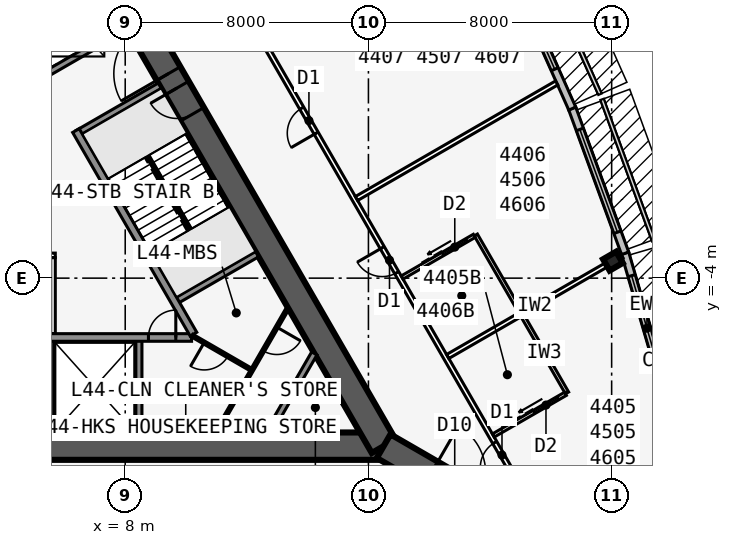
"""IFC4 building model, lengths in metres.
Left out: names, types, materials, properties, quantities, classifications, styles, units other than length and angle.
Written with IfcOpenShell. Run it as: python <this file> out.ifc"""

import sys

from ifc_helpers import new_model, si_unit, direction, frame, frame_2d, origin, origin_2d, place, context, subcontext, project, spatial, rectangle, i_section, extrude, element, fill, save


model = new_model("IFC4")
c1 = context("Model", 3, precision=1e-05, world=origin(), true_north=direction((0.0, 1.0)))
c2 = subcontext(c1, "Body", "Model", "MODEL_VIEW")
j1 = project(units=[si_unit("LENGTHUNIT", "METRE"), si_unit("PLANEANGLEUNIT", "RADIAN")], contexts=[c1])
p1 = place(None, origin())
s1 = spatial("IfcSite", under=j1, at=p1, CompositionType="ELEMENT")
p2 = place(p1, origin())
s2 = spatial("IfcBuilding", under=s1, at=p2, CompositionType="ELEMENT")
p3 = place(p2, frame((0.0, 0.0, 165.7)))
s3 = spatial("IfcBuildingStorey", under=s2, at=p3, CompositionType="ELEMENT", Elevation=165.7)
p4 = place(p3, frame((-16.5, -9.526, 0.0), z_axis=(0.0, 0.0, 1.0), x_axis=(1.0, 0.0, 0.0)))
e1 = element("IfcWall", 1, at=p4, inside=s3, PredefinedType="SHEAR", context=c2, shape_type="SweptSolid", body=[
    extrude(rectangle(XDim=33.0, YDim=0.9, at=frame_2d((16.5, 0.0))), origin(), (0.0, 0.0, 1.0), 3.4),
])
p5 = place(p4, frame((14.05, 0.0, 0.0)))
e2 = element("IfcOpeningElement", 2, at=p5, cuts=e1, PredefinedType="OPENING", context=c2, shape_type="SweptSolid", body=[
    extrude(rectangle(XDim=1.8, YDim=2.13, at=frame_2d((0.9, 1.065))), frame((0.0, 0.46, 0.0), z_axis=(0.0, -1.0, 0.0), x_axis=(1.0, 0.0, 0.0)), (0.0, 0.0, 1.0), 0.92),
])
p6 = place(p3, frame((-0.55, -5.951, 0.0), z_axis=(0.0, 0.0, 1.0), x_axis=(1.0, 0.0, 0.0)))
e3 = element("IfcWall", 3, at=p6, inside=s3, PredefinedType="SOLIDWALL", context=c2, shape_type="SweptSolid", body=[
    extrude(rectangle(XDim=10.733, YDim=0.25, at=frame_2d((5.366, 0.0))), origin(), (0.0, 0.0, 1.0), 3.235),
])
p7 = place(p6, frame((9.314, 0.0, 0.0)))
e4 = element("IfcOpeningElement", 4, at=p7, cuts=e3, PredefinedType="OPENING", context=c2, shape_type="SweptSolid", body=[
    extrude(rectangle(XDim=0.9, YDim=2.13, at=frame_2d((0.45, 1.065))), frame((0.0, 0.135, 0.0), z_axis=(0.0, -1.0, 0.0), x_axis=(1.0, 0.0, 0.0)), (0.0, 0.0, 1.0), 0.27),
])
p8 = place(p6, frame((1.05, 0.0, 0.0)))
e5 = element("IfcOpeningElement", 5, at=p8, cuts=e3, PredefinedType="OPENING", context=c2, shape_type="SweptSolid", body=[
    extrude(rectangle(XDim=1.1, YDim=2.13, at=frame_2d((0.55, 1.065))), frame((0.0, 0.135, 0.0), z_axis=(0.0, -1.0, 0.0), x_axis=(1.0, 0.0, 0.0)), (0.0, 0.0, 1.0), 0.27),
])
p9 = place(p6, frame((4.05, 0.0, 0.0)))
e6 = element("IfcOpeningElement", 6, at=p9, cuts=e3, PredefinedType="OPENING", context=c2, shape_type="SweptSolid", body=[
    extrude(rectangle(XDim=1.1, YDim=2.13, at=frame_2d((0.55, 1.065))), frame((0.0, 0.135, 0.0), z_axis=(0.0, -1.0, 0.0), x_axis=(1.0, 0.0, 0.0)), (0.0, 0.0, 1.0), 0.27),
])
for number, where, z_axis, x_axis in (
    (7, (5.55, -5.951, 0.0), (0.0, 0.0, 1.0), (0.0, -1.0, 0.0)),
    (8, (8.45, -5.951, 0.0), (0.0, 0.0, 1.0), (0.0, -1.0, 0.0)),
):
    element("IfcWall", number, at=place(p3, frame(where, z_axis=z_axis, x_axis=x_axis)), inside=s3, PredefinedType="SOLIDWALL", context=c2, shape_type="SweptSolid", body=[
        extrude(rectangle(XDim=3.125, YDim=0.2, at=frame_2d((1.562, 0.0))), origin(), (0.0, 0.0, 1.0), 3.235),
    ])
p10 = place(p3, frame((16.5, -9.526, 0.0), z_axis=(0.0, 0.0, 1.0), x_axis=(-0.499999749417, 0.866025548458, 0.0)))
e9 = element("IfcWall", 9, at=p10, inside=s3, PredefinedType="SHEAR", context=c2, shape_type="SweptSolid", body=[
    extrude(rectangle(XDim=33.0, YDim=0.9, at=frame_2d((16.5, 0.0))), origin(), (0.0, 0.0, 1.0), 3.4),
])
p11 = place(p10, frame((14.15, 0.0, 0.0)))
e10 = element("IfcOpeningElement", 10, at=p11, cuts=e9, PredefinedType="OPENING", context=c2, shape_type="SweptSolid", body=[
    extrude(rectangle(XDim=1.8, YDim=2.13, at=frame_2d((0.9, 1.065))), frame((0.0, 0.46, 0.0), z_axis=(0.0, -1.0, 0.0), x_axis=(1.0, 0.0, 0.0)), (0.0, 0.0, 1.0), 0.92),
])
p12 = place(p10, frame((12.6, 0.0, 0.0)))
e11 = element("IfcOpeningElement", 11, at=p12, cuts=e9, PredefinedType="OPENING", context=c2, shape_type="SweptSolid", body=[
    extrude(rectangle(XDim=1.0, YDim=2.13, at=frame_2d((0.5, 1.065))), frame((0.0, 0.46, 0.0), z_axis=(0.0, -1.0, 0.0), x_axis=(1.0, 0.0, 0.0)), (0.0, 0.0, 1.0), 0.92),
])
p13 = place(p3, frame((10.245, -5.843, 0.0), z_axis=(0.0, 0.0, 1.0), x_axis=(-0.499993009313, 0.866029439822, 0.0)))
e12 = element("IfcWall", 12, at=p13, inside=s3, PredefinedType="SOLIDWALL", context=c2, shape_type="SweptSolid", body=[
    extrude(rectangle(XDim=7.733, YDim=0.25, at=frame_2d((3.866, 0.0))), origin(), (0.0, 0.0, 1.0), 3.235),
])
for number, where, z_axis, x_axis in (
    (13, (9.629, -4.775, 0.0), (0.0, 0.0, 1.0), (0.866, 0.5, 0.0)),
    (14, (6.429, 0.767, 0.0), (0.0, 0.0, 1.0), (0.866, 0.5, 0.0)),
    (15, (5.329, 2.673, 0.0), (0.0, 0.0, 1.0), (0.866, 0.5, 0.0)),
):
    element("IfcWall", number, at=place(p3, frame(where, z_axis=z_axis, x_axis=x_axis)), inside=s3, PredefinedType="SOLIDWALL", context=c2, shape_type="SweptSolid", body=[
        extrude(rectangle(XDim=3.125, YDim=0.2, at=frame_2d((1.562, 0.0))), origin(), (0.0, 0.0, 1.0), 3.235),
    ])
p14 = place(p3, frame((16.5, -9.526, 0.0), z_axis=(0.0, 0.0, 1.0), x_axis=(0.866031398331, -0.499989616998, 0.0)))
e16 = element("IfcWall", 16, at=p14, inside=s3, PredefinedType="SHEAR", context=c2, shape_type="SweptSolid", body=[
    extrude(rectangle(XDim=4.746, YDim=0.9, at=frame_2d((2.373, 0.0))), origin(), (0.0, 0.0, 1.0), 3.4),
])
p15 = place(p14, frame((1.8, 0.0, 0.0)))
e17 = element("IfcOpeningElement", 17, at=p15, cuts=e16, PredefinedType="OPENING", context=c2, shape_type="SweptSolid", body=[
    extrude(rectangle(XDim=1.8, YDim=2.13, at=frame_2d((0.9, 1.065))), frame((0.0, 0.46, 0.0), z_axis=(0.0, -1.0, 0.0), x_axis=(1.0, 0.0, 0.0)), (0.0, 0.0, 1.0), 0.92),
])
p16 = place(p3, frame((24.041, -3.44, 0.0), z_axis=(0.0, 0.0, 1.0), x_axis=(-0.5, 0.866025403784, 0.0)))
e18 = element("IfcColumn", 18, at=p16, inside=s3, PredefinedType="COLUMN", context=c2, shape_type="SweptSolid", body=[
    extrude(i_section(OverallWidth=0.432, OverallDepth=0.498, WebThickness=0.056, FlangeThickness=0.089, at=origin_2d()), origin(), (0.0, 0.0, 1.0), 3.4),
])
p17 = place(p3, frame((25.88, -8.118, 0.0), z_axis=(0.0, 0.0, 1.0), x_axis=(-0.279528287117, 0.960137457191, 0.0)))
e19 = element("IfcWall", 19, at=p17, inside=s3, PredefinedType="STANDARD", context=c2, shape_type="SweptSolid", body=[
    extrude(rectangle(XDim=5.148, YDim=0.25, at=frame_2d((2.574, 0.0))), origin(), (0.0, 0.0, 1.0), 3.235),
])
p18 = place(p17, frame((0.774, 0.0, 0.45)))
e20 = element("IfcOpeningElement", 20, at=p18, cuts=e19, PredefinedType="OPENING", context=c2, shape_type="SweptSolid", body=[
    extrude(rectangle(XDim=3.6, YDim=2.4, at=frame_2d((1.8, 1.2))), frame((0.0, 0.135, 0.0), z_axis=(0.0, -1.0, 0.0), x_axis=(1.0, 0.0, 0.0)), (0.0, 0.0, 1.0), 0.27),
])
p19 = place(p3, frame((24.444, -3.183, 0.0), z_axis=(0.0, 0.0, 1.0), x_axis=(-0.343225593282, 0.939252996863, 0.0)))
e21 = element("IfcWall", 21, at=p19, inside=s3, PredefinedType="STANDARD", context=c2, shape_type="SweptSolid", body=[
    extrude(rectangle(XDim=5.076, YDim=0.25, at=frame_2d((2.538, 0.0))), origin(), (0.0, 0.0, 1.0), 3.235),
])
p20 = place(p19, frame((0.738, 0.0, 0.45)))
e22 = element("IfcOpeningElement", 22, at=p20, cuts=e21, PredefinedType="OPENING", context=c2, shape_type="SweptSolid", body=[
    extrude(rectangle(XDim=3.6, YDim=2.4, at=frame_2d((1.8, 1.2))), frame((0.0, 0.135, 0.0), z_axis=(0.0, -1.0, 0.0), x_axis=(1.0, 0.0, 0.0)), (0.0, 0.0, 1.0), 0.27),
])
p21 = place(p3, frame((22.705, 1.576, 0.0), z_axis=(0.0, 0.0, 1.0), x_axis=(-0.406832200364, 0.913502906808, 0.0)))
e23 = element("IfcWall", 23, at=p21, inside=s3, PredefinedType="STANDARD", context=c2, shape_type="SweptSolid", body=[
    extrude(rectangle(XDim=5.028, YDim=0.25, at=frame_2d((2.514, 0.0))), origin(), (0.0, 0.0, 1.0), 3.235),
])
p22 = place(p21, frame((1.418, 0.0, 0.45)))
e24 = element("IfcOpeningElement", 24, at=p22, cuts=e23, PredefinedType="OPENING", context=c2, shape_type="SweptSolid", body=[
    extrude(rectangle(XDim=3.0, YDim=2.4, at=frame_2d((1.5, 1.2))), frame((0.0, 0.135, 0.0), z_axis=(0.0, -1.0, 0.0), x_axis=(1.0, 0.0, 0.0)), (0.0, 0.0, 1.0), 0.27),
])
p23 = place(p3, frame((21.586, -11.885, 0.0), z_axis=(0.0, 0.0, 1.0), x_axis=(-0.500001915564, 0.86602429783, 0.0)))
e25 = element("IfcWall", 25, at=p23, inside=s3, PredefinedType="PARTITIONING", context=c2, shape_type="SweptSolid", body=[
    extrude(rectangle(XDim=42.172, YDim=0.15, at=frame_2d((21.086, 0.0))), origin(), (0.0, 0.0, 1.0), 3.235),
])
p24 = place(p23, frame((1.911, 0.0, 0.0)))
e26 = element("IfcOpeningElement", 26, at=p24, cuts=e25, PredefinedType="OPENING", context=c2, shape_type="SweptSolid", body=[
    extrude(rectangle(XDim=0.95, YDim=2.13, at=frame_2d((0.475, 1.065))), frame((0.0, 0.085, 0.0), z_axis=(0.0, -1.0, 0.0), x_axis=(1.0, 0.0, 0.0)), (0.0, 0.0, 1.0), 0.17),
])
p25 = place(p23, frame((9.311, 0.0, 0.0)))
e27 = element("IfcOpeningElement", 27, at=p25, cuts=e25, PredefinedType="OPENING", context=c2, shape_type="SweptSolid", body=[
    extrude(rectangle(XDim=0.95, YDim=2.13, at=frame_2d((0.475, 1.065))), frame((0.0, 0.085, 0.0), z_axis=(0.0, -1.0, 0.0), x_axis=(1.0, 0.0, 0.0)), (0.0, 0.0, 1.0), 0.17),
])
p26 = place(p23, frame((14.611, 0.0, 0.0)))
e28 = element("IfcOpeningElement", 28, at=p26, cuts=e25, PredefinedType="OPENING", context=c2, shape_type="SweptSolid", body=[
    extrude(rectangle(XDim=0.95, YDim=2.13, at=frame_2d((0.475, 1.065))), frame((0.0, 0.085, 0.0), z_axis=(0.0, -1.0, 0.0), x_axis=(1.0, 0.0, 0.0)), (0.0, 0.0, 1.0), 0.17),
])
p27 = place(p23, frame((26.711, 0.0, 0.0)))
e29 = element("IfcOpeningElement", 29, at=p27, cuts=e25, PredefinedType="OPENING", context=c2, shape_type="SweptSolid", body=[
    extrude(rectangle(XDim=0.95, YDim=2.13, at=frame_2d((0.475, 1.065))), frame((0.0, 0.085, 0.0), z_axis=(0.0, -1.0, 0.0), x_axis=(1.0, 0.0, 0.0)), (0.0, 0.0, 1.0), 0.17),
])
p28 = place(p23, frame((38.884, 0.0, 0.0)))
e30 = element("IfcOpeningElement", 30, at=p28, cuts=e25, PredefinedType="OPENING", context=c2, shape_type="SweptSolid", body=[
    extrude(rectangle(XDim=0.95, YDim=2.13, at=frame_2d((0.475, 1.065))), frame((0.0, 0.085, 0.0), z_axis=(0.0, -1.0, 0.0), x_axis=(1.0, 0.0, 0.0)), (0.0, 0.0, 1.0), 0.17),
])
p29 = place(p3, frame((18.608, -6.577, 0.0), z_axis=(0.0, 0.0, 1.0), x_axis=(0.866031967744, 0.499988630717, 0.0)))
e31 = element("IfcWall", 31, at=p29, inside=s3, PredefinedType="PARTITIONING", context=c2, shape_type="SweptSolid", body=[
    extrude(rectangle(XDim=6.616, YDim=0.15, at=frame_2d((3.308, 0.0))), origin(), (0.0, 0.0, 1.0), 2.389),
])
p30 = place(p3, frame((15.608, -1.381, 0.0), z_axis=(0.0, 0.0, 1.0), x_axis=(0.866025154315, 0.500000432093, 0.0)))
e32 = element("IfcWall", 32, at=p30, inside=s3, PredefinedType="PARTITIONING", context=c2, shape_type="SweptSolid", body=[
    extrude(rectangle(XDim=7.603, YDim=0.15, at=frame_2d((3.801, 0.0))), origin(), (0.0, 0.0, 1.0), 3.235),
])
p31 = place(p3, frame((22.533, -7.775, 0.0), z_axis=(0.0, 0.0, 1.0), x_axis=(-0.499990139034, 0.866031096941, 0.0)))
e33 = element("IfcWall", 33, at=p31, inside=s3, PredefinedType="PLUMBINGWALL", context=c2, shape_type="SweptSolid", body=[
    extrude(rectangle(XDim=3.0, YDim=0.12, at=frame_2d((1.5, 0.0))), origin(), (0.0, 0.0, 1.0), 3.235),
])
p32 = place(p3, frame((20.108, -9.175, 0.0), z_axis=(0.0, 0.0, 1.0), x_axis=(0.866035715982, 0.499982138324, 0.0)))
e34 = element("IfcWall", 34, at=p32, inside=s3, PredefinedType="PLUMBINGWALL", context=c2, shape_type="SweptSolid", body=[
    extrude(rectangle(XDim=2.74, YDim=0.12, at=frame_2d((1.37, 0.0))), origin(), (0.0, 0.0, 1.0), 3.235),
])
p33 = place(p32, frame((1.55, 0.0, 0.0)))
e35 = element("IfcOpeningElement", 35, at=p33, cuts=e34, PredefinedType="OPENING", context=c2, shape_type="SweptSolid", body=[
    extrude(rectangle(XDim=0.9, YDim=2.13, at=frame_2d((0.45, 1.065))), frame((0.0, 0.07, 0.0), z_axis=(0.0, -1.0, 0.0), x_axis=(1.0, 0.0, 0.0)), (0.0, 0.0, 1.0), 0.14),
])
p34 = place(p3, frame((21.033, -5.177, 0.0), z_axis=(0.0, 0.0, 1.0), x_axis=(-0.499990139034, 0.866031096941, 0.0)))
e36 = element("IfcWall", 36, at=p34, inside=s3, PredefinedType="PLUMBINGWALL", context=c2, shape_type="SweptSolid", body=[
    extrude(rectangle(XDim=3.0, YDim=0.12, at=frame_2d((1.5, 0.0))), origin(), (0.0, 0.0, 1.0), 3.235),
])
p35 = place(p3, frame((17.108, -3.979, 0.0), z_axis=(0.0, 0.0, 1.0), x_axis=(0.865997131366, 0.500048966069, 0.0)))
e37 = element("IfcWall", 37, at=p35, inside=s3, PredefinedType="PLUMBINGWALL", context=c2, shape_type="SweptSolid", body=[
    extrude(rectangle(XDim=2.74, YDim=0.12, at=frame_2d((1.37, 0.0))), origin(), (0.0, 0.0, 1.0), 3.235),
])
p36 = place(p35, frame((1.55, 0.0, 0.0)))
e38 = element("IfcOpeningElement", 38, at=p36, cuts=e37, PredefinedType="OPENING", context=c2, shape_type="SweptSolid", body=[
    extrude(rectangle(XDim=0.9, YDim=2.13, at=frame_2d((0.45, 1.065))), frame((0.0, 0.07, 0.0), z_axis=(0.0, -1.0, 0.0), x_axis=(1.0, 0.0, 0.0)), (0.0, 0.0, 1.0), 0.14),
])
p37 = place(p3, frame((-2.65, -3.251, 0.0), z_axis=(0.0, 0.0, 1.0), x_axis=(1.0, 0.0, 0.0)))
e39 = element("IfcWall", 39, at=p37, inside=s3, PredefinedType="PARTITIONING", context=c2, shape_type="SweptSolid", body=[
    extrude(rectangle(XDim=8.35, YDim=0.15, at=frame_2d((4.175, 0.0))), origin(), (0.0, 0.0, 1.0), 3.235),
])
p38 = place(p3, frame((5.625, -5.826, 0.0), z_axis=(0.0, 0.0, 1.0), x_axis=(0.0, 1.0, 0.0)))
e40 = element("IfcWall", 40, at=p38, inside=s3, PredefinedType="PARTITIONING", context=c2, shape_type="SweptSolid", body=[
    extrude(rectangle(XDim=2.5, YDim=0.15, at=frame_2d((1.25, 0.0))), origin(), (0.0, 0.0, 1.0), 3.235),
])
p39 = place(p3, frame((14.219, -6.476, 0.0), z_axis=(0.0, 0.0, 1.0), x_axis=(-0.499952404951, -0.866052881055, 0.0)))
e41 = element("IfcWall", 41, at=p39, inside=s3, PredefinedType="SOLIDWALL", context=c2, shape_type="SweptSolid", body=[
    extrude(rectangle(XDim=3.002, YDim=0.2, at=frame_2d((1.501, 0.0))), origin(), (0.0, 0.0, 1.0), 3.235),
])
p40 = place(p3, frame((13.354, -4.976, 0.0), z_axis=(0.0, 0.0, 1.0), x_axis=(-0.499999210213, -0.866025859768, 0.0)))
e42 = element("IfcWall", 42, at=p40, inside=s3, PredefinedType="PARTITIONING", context=c2, shape_type="SweptSolid", body=[
    extrude(rectangle(XDim=4.734, YDim=0.1, at=frame_2d((2.367, 0.0))), origin(), (0.0, 0.0, 1.0), 3.235),
])
p41 = place(p40, frame((0.734, 0.0, 0.0)))
e43 = element("IfcOpeningElement", 43, at=p41, cuts=e42, PredefinedType="OPENING", context=c2, shape_type="SweptSolid", body=[
    extrude(rectangle(XDim=0.9, YDim=2.13, at=frame_2d((0.45, 1.065))), frame((0.0, 0.06, 0.0), z_axis=(0.0, -1.0, 0.0), x_axis=(1.0, 0.0, 0.0)), (0.0, 0.0, 1.0), 0.12),
])
p42 = place(p3, frame((12.17, -7.026, 0.0), z_axis=(0.0, 0.0, 1.0), x_axis=(-0.866015833478, 0.50001657589, 0.0)))
e44 = element("IfcWall", 44, at=p42, inside=s3, PredefinedType="PARTITIONING", context=c2, shape_type="SweptSolid", body=[
    extrude(rectangle(XDim=2.275, YDim=0.1, at=frame_2d((1.138, 0.0))), origin(), (0.0, 0.0, 1.0), 3.235),
])
p43 = place(p42, frame((0.915, 0.0, 0.0)))
e45 = element("IfcOpeningElement", 45, at=p43, cuts=e44, PredefinedType="OPENING", context=c2, shape_type="SweptSolid", body=[
    extrude(rectangle(XDim=0.9, YDim=2.13, at=frame_2d((0.45, 1.065))), frame((0.0, 0.06, 0.0), z_axis=(0.0, -1.0, 0.0), x_axis=(1.0, 0.0, 0.0)), (0.0, 0.0, 1.0), 0.12),
])
p44 = place(p3, frame((10.135, -2.401, 0.0), z_axis=(0.0, 0.0, 1.0), x_axis=(-0.499992232847, 0.866029888106, 0.0)))
e46 = element("IfcWall", 46, at=p44, inside=s3, PredefinedType="SOLIDWALL", context=c2, shape_type="SweptSolid", body=[
    extrude(rectangle(XDim=2.794, YDim=0.1, at=frame_2d((1.397, 0.0))), origin(), (0.0, 0.0, 1.0), 3.4),
])
p45 = place(p18, origin())
e47 = element("IfcWindow", 47, at=p45, inside=s3, PartitioningType="SINGLE_PANEL", PredefinedType="WINDOW", context=c2, shape_type="SweptSolid", body=[
    extrude(rectangle(XDim=3.6, YDim=2.4, at=frame_2d((1.8, 1.2))), frame((0.0, 0.03, 0.0), z_axis=(0.0, -1.0, 0.0), x_axis=(1.0, 0.0, 0.0)), (0.0, 0.0, 1.0), 0.06),
])
fill(e20, e47)
p46 = place(p20, origin())
e48 = element("IfcWindow", 48, at=p46, inside=s3, PartitioningType="SINGLE_PANEL", PredefinedType="WINDOW", context=c2, shape_type="SweptSolid", body=[
    extrude(rectangle(XDim=3.6, YDim=2.4, at=frame_2d((1.8, 1.2))), frame((0.0, 0.03, 0.0), z_axis=(0.0, -1.0, 0.0), x_axis=(1.0, 0.0, 0.0)), (0.0, 0.0, 1.0), 0.06),
])
fill(e22, e48)
p47 = place(p22, origin())
e49 = element("IfcWindow", 49, at=p47, inside=s3, PartitioningType="SINGLE_PANEL", PredefinedType="WINDOW", context=c2, shape_type="SweptSolid", body=[
    extrude(rectangle(XDim=3.0, YDim=2.4, at=frame_2d((1.5, 1.2))), frame((0.0, 0.03, 0.0), z_axis=(0.0, -1.0, 0.0), x_axis=(1.0, 0.0, 0.0)), (0.0, 0.0, 1.0), 0.06),
])
fill(e24, e49)
p48 = place(p33, origin())
e50 = element("IfcDoor", 50, at=p48, inside=s3, OperationType="SLIDING_TO_LEFT", PredefinedType="DOOR", context=c2, shape_type="SweptSolid", body=[
    extrude(rectangle(XDim=0.9, YDim=2.13, at=frame_2d((0.45, 1.065))), frame((0.0, 0.025, 0.0), z_axis=(0.0, -1.0, 0.0), x_axis=(1.0, 0.0, 0.0)), (0.0, 0.0, 1.0), 0.05),
])
fill(e35, e50)
p49 = place(p24, origin())
e51 = element("IfcDoor", 51, at=p49, inside=s3, OperationType="SINGLE_SWING_LEFT", PredefinedType="DOOR", context=c2, shape_type="SweptSolid", body=[
    extrude(rectangle(XDim=0.95, YDim=2.13, at=frame_2d((0.475, 1.065))), frame((0.0, 0.025, 0.0), z_axis=(0.0, -1.0, 0.0), x_axis=(1.0, 0.0, 0.0)), (0.0, 0.0, 1.0), 0.05),
])
fill(e26, e51)
p50 = place(p36, origin())
e52 = element("IfcDoor", 52, at=p50, inside=s3, OperationType="SLIDING_TO_LEFT", PredefinedType="DOOR", context=c2, shape_type="SweptSolid", body=[
    extrude(rectangle(XDim=0.9, YDim=2.13, at=frame_2d((0.45, 1.065))), frame((0.0, 0.025, 0.0), z_axis=(0.0, -1.0, 0.0), x_axis=(1.0, 0.0, 0.0)), (0.0, 0.0, 1.0), 0.05),
])
fill(e38, e52)
p51 = place(p25, origin())
e53 = element("IfcDoor", 53, at=p51, inside=s3, OperationType="SINGLE_SWING_RIGHT", PredefinedType="DOOR", context=c2, shape_type="SweptSolid", body=[
    extrude(rectangle(XDim=0.95, YDim=2.13, at=frame_2d((0.475, 1.065))), frame((0.0, 0.025, 0.0), z_axis=(0.0, -1.0, 0.0), x_axis=(1.0, 0.0, 0.0)), (0.0, 0.0, 1.0), 0.05),
])
fill(e27, e53)
p52 = place(p26, origin())
e54 = element("IfcDoor", 54, at=p52, inside=s3, OperationType="SINGLE_SWING_LEFT", PredefinedType="DOOR", context=c2, shape_type="SweptSolid", body=[
    extrude(rectangle(XDim=0.95, YDim=2.13, at=frame_2d((0.475, 1.065))), frame((0.0, 0.025, 0.0), z_axis=(0.0, -1.0, 0.0), x_axis=(1.0, 0.0, 0.0)), (0.0, 0.0, 1.0), 0.05),
])
fill(e28, e54)
p53 = place(p11, origin())
e55 = element("IfcDoor", 55, at=p53, inside=s3, OperationType="DOUBLE_DOOR_SINGLE_SWING", PredefinedType="DOOR", context=c2, shape_type="SweptSolid", body=[
    extrude(rectangle(XDim=1.8, YDim=2.13, at=frame_2d((0.9, 1.065))), frame((0.0, 0.025, 0.0), z_axis=(0.0, -1.0, 0.0), x_axis=(1.0, 0.0, 0.0)), (0.0, 0.0, 1.0), 0.05),
])
fill(e10, e55)
p54 = place(p12, origin())
e56 = element("IfcDoor", 56, at=p54, inside=s3, OperationType="SINGLE_SWING_RIGHT", PredefinedType="DOOR", context=c2, shape_type="SweptSolid", body=[
    extrude(rectangle(XDim=1.0, YDim=2.13, at=frame_2d((0.5, 1.065))), frame((0.0, 0.025, 0.0), z_axis=(0.0, -1.0, 0.0), x_axis=(1.0, 0.0, 0.0)), (0.0, 0.0, 1.0), 0.05),
])
fill(e11, e56)
p55 = place(p41, origin())
e57 = element("IfcDoor", 57, at=p55, inside=s3, OperationType="SINGLE_SWING_LEFT", PredefinedType="DOOR", context=c2, shape_type="SweptSolid", body=[
    extrude(rectangle(XDim=0.9, YDim=2.13, at=frame_2d((0.45, 1.065))), frame((0.0, 0.025, 0.0), z_axis=(0.0, -1.0, 0.0), x_axis=(1.0, 0.0, 0.0)), (0.0, 0.0, 1.0), 0.05),
])
fill(e43, e57)
p56 = place(p7, origin())
e58 = element("IfcDoor", 58, at=p56, inside=s3, OperationType="SINGLE_SWING_RIGHT", PredefinedType="DOOR", context=c2, shape_type="SweptSolid", body=[
    extrude(rectangle(XDim=0.9, YDim=2.13, at=frame_2d((0.45, 1.065))), frame((0.0, 0.025, 0.0), z_axis=(0.0, -1.0, 0.0), x_axis=(1.0, 0.0, 0.0)), (0.0, 0.0, 1.0), 0.05),
])
fill(e4, e58)
p57 = place(p43, origin())
e59 = element("IfcDoor", 59, at=p57, inside=s3, OperationType="SINGLE_SWING_RIGHT", PredefinedType="DOOR", context=c2, shape_type="SweptSolid", body=[
    extrude(rectangle(XDim=0.9, YDim=2.13, at=frame_2d((0.45, 1.065))), frame((0.0, 0.025, 0.0), z_axis=(0.0, -1.0, 0.0), x_axis=(1.0, 0.0, 0.0)), (0.0, 0.0, 1.0), 0.05),
])
fill(e45, e59)
save(model, sys.argv[1])
